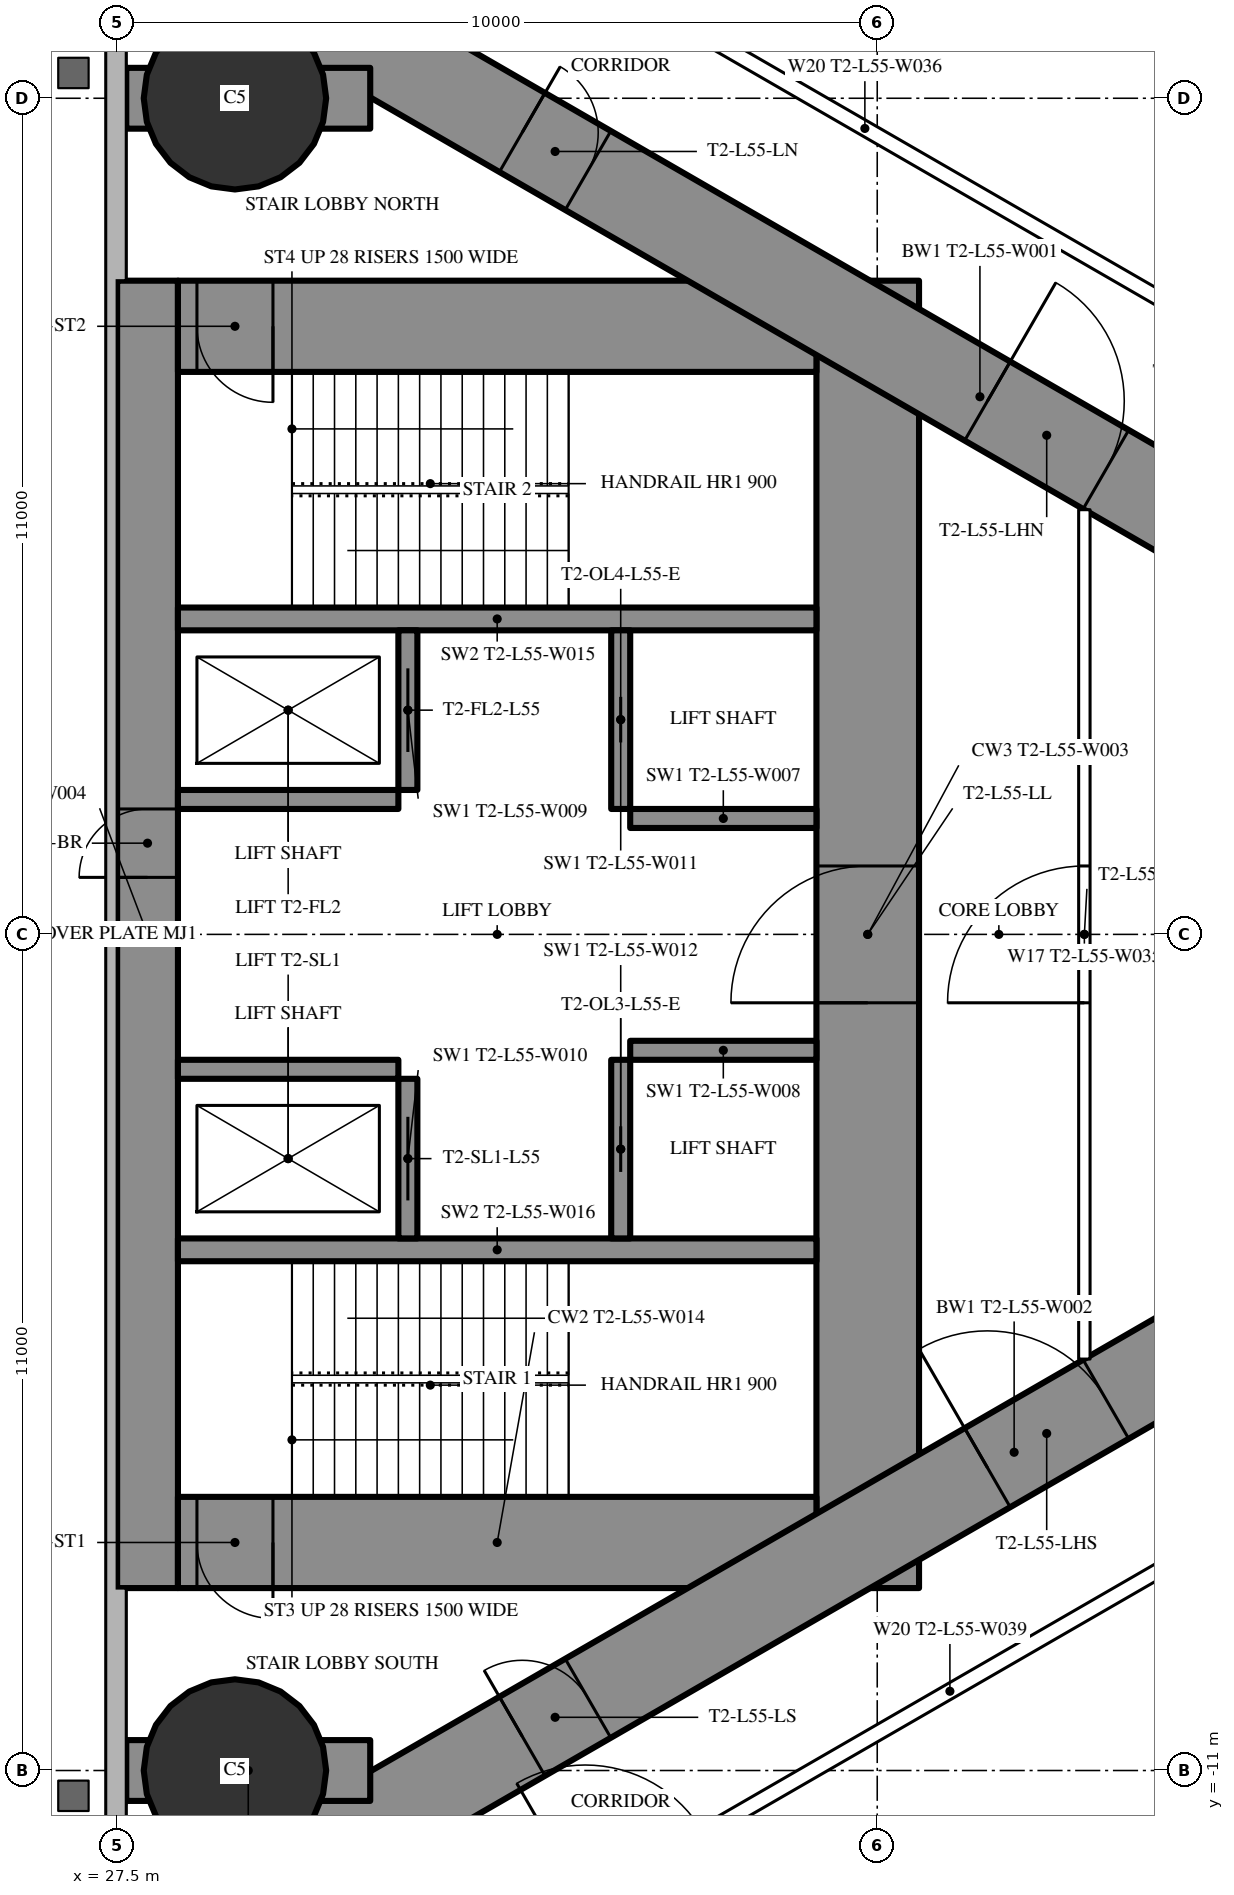
"""IFC4 building model, lengths in metres.
Left out: names, types, materials, properties, quantities, classifications, styles, units other than length and angle.
Written with IfcOpenShell. Run it as: python <this file> out.ifc"""

import sys

from ifc_helpers import new_model, si_unit, direction, frame, frame_2d, origin, origin_2d, place, context, subcontext, project, spatial, rectangle, hollow_circle, extrude, element, fill, save


model = new_model("IFC4")
c1 = context("Model", 3, precision=1e-05, world=origin(), true_north=direction((0.0, 1.0)))
c2 = subcontext(c1, "Body", "Model", "MODEL_VIEW")
j1 = project(units=[si_unit("LENGTHUNIT", "METRE"), si_unit("PLANEANGLEUNIT", "RADIAN")], contexts=[c1])
p1 = place(None, origin())
s1 = spatial("IfcSite", under=j1, at=p1, CompositionType="ELEMENT")
p2 = place(p1, origin())
s2 = spatial("IfcBuilding", under=s1, at=p2, CompositionType="ELEMENT")
p3 = place(p2, frame((0.0, 0.0, 205.3)))
s3 = spatial("IfcBuildingStorey", under=s2, at=p3, CompositionType="ELEMENT", Elevation=205.3)
for number, where, z_axis, x_axis in (
    (1, (29.05, 11.0, 0.0), (0.0, 0.0, 1.0), (1.0, 0.0, 0.0)),
    (2, (29.05, -11.0, 0.0), (0.0, 0.0, 1.0), (1.0, 0.0, 0.0)),
):
    element("IfcColumn", number, at=place(p3, frame(where, z_axis=z_axis, x_axis=x_axis)), inside=s3, PredefinedType="COLUMN", context=c2, shape_type="SweptSolid", body=[
        extrude(hollow_circle(Radius=1.2, WallThickness=0.09, at=origin_2d()), origin(), (0.0, 0.0, 1.0), 5.0),
    ])
p4 = place(p3, frame((27.9, -8.6, 0.0), z_axis=(0.0, 0.0, 1.0), x_axis=(0.0, 1.0, 0.0)))
e3 = element("IfcWall", 3, at=p4, inside=s3, PredefinedType="SHEAR", context=c2, shape_type="SweptSolid", body=[
    extrude(rectangle(XDim=17.2, YDim=0.8, at=frame_2d((8.6, 0.0))), origin(), (0.0, 0.0, 1.0), 5.0),
])
p5 = place(p4, frame((9.35, 0.0, 0.0)))
e4 = element("IfcOpeningElement", 4, at=p5, cuts=e3, PredefinedType="OPENING", context=c2, shape_type="SweptSolid", body=[
    extrude(rectangle(XDim=0.9, YDim=2.2, at=frame_2d((0.45, 1.1))), frame((0.0, 0.41, 0.0), z_axis=(0.0, -1.0, 0.0), x_axis=(1.0, 0.0, 0.0)), (0.0, 0.0, 1.0), 0.82),
])
p6 = place(p3, frame((37.375, -8.6, 0.0), z_axis=(0.0, 0.0, 1.0), x_axis=(0.0, 1.0, 0.0)))
e5 = element("IfcWall", 5, at=p6, inside=s3, PredefinedType="SHEAR", context=c2, shape_type="SweptSolid", body=[
    extrude(rectangle(XDim=17.2, YDim=1.35, at=frame_2d((8.6, 0.0))), origin(), (0.0, 0.0, 1.0), 5.0),
])
p7 = place(p6, frame((7.7, 0.0, 0.0)))
e6 = element("IfcOpeningElement", 6, at=p7, cuts=e5, PredefinedType="OPENING", context=c2, shape_type="SweptSolid", body=[
    extrude(rectangle(XDim=1.8, YDim=2.2, at=frame_2d((0.9, 1.1))), frame((0.0, 0.685, 0.0), z_axis=(0.0, -1.0, 0.0), x_axis=(1.0, 0.0, 0.0)), (0.0, 0.0, 1.0), 1.37),
])
p8 = place(p3, frame((28.3, -8.0, 0.0), z_axis=(0.0, 0.0, 1.0), x_axis=(1.0, 0.0, 0.0)))
e7 = element("IfcWall", 7, at=p8, inside=s3, PredefinedType="SHEAR", context=c2, shape_type="SweptSolid", body=[
    extrude(rectangle(XDim=8.4, YDim=1.2, at=frame_2d((4.2, 0.0))), origin(), (0.0, 0.0, 1.0), 5.0),
])
p9 = place(p8, frame((0.25, 0.0, 0.0)))
e8 = element("IfcOpeningElement", 8, at=p9, cuts=e7, PredefinedType="OPENING", context=c2, shape_type="SweptSolid", body=[
    extrude(rectangle(XDim=1.0, YDim=2.2, at=frame_2d((0.5, 1.1))), frame((0.0, 0.61, 0.0), z_axis=(0.0, -1.0, 0.0), x_axis=(1.0, 0.0, 0.0)), (0.0, 0.0, 1.0), 1.22),
])
p10 = place(p3, frame((28.3, 8.0, 0.0), z_axis=(0.0, 0.0, 1.0), x_axis=(1.0, 0.0, 0.0)))
e9 = element("IfcWall", 9, at=p10, inside=s3, PredefinedType="SHEAR", context=c2, shape_type="SweptSolid", body=[
    extrude(rectangle(XDim=8.4, YDim=1.2, at=frame_2d((4.2, 0.0))), origin(), (0.0, 0.0, 1.0), 5.0),
])
p11 = place(p10, frame((0.25, 0.0, 0.0)))
e10 = element("IfcOpeningElement", 10, at=p11, cuts=e9, PredefinedType="OPENING", context=c2, shape_type="SweptSolid", body=[
    extrude(rectangle(XDim=1.0, YDim=2.2, at=frame_2d((0.5, 1.1))), frame((0.0, 0.61, 0.0), z_axis=(0.0, -1.0, 0.0), x_axis=(1.0, 0.0, 0.0)), (0.0, 0.0, 1.0), 1.22),
])
for number, where, z_axis, x_axis in (
    (11, (28.3, -4.15, 0.0), (0.0, 0.0, 1.0), (1.0, 0.0, 0.0)),
    (12, (28.3, 4.15, 0.0), (0.0, 0.0, 1.0), (1.0, 0.0, 0.0)),
):
    element("IfcWall", number, at=place(p3, frame(where, z_axis=z_axis, x_axis=x_axis)), inside=s3, PredefinedType="SHEAR", context=c2, shape_type="SweptSolid", body=[
        extrude(rectangle(XDim=8.4, YDim=0.3, at=frame_2d((4.2, 0.0))), origin(), (0.0, 0.0, 1.0), 5.0),
    ])
p12 = place(p3, frame((31.325, -4.0, 0.0), z_axis=(0.0, 0.0, 1.0), x_axis=(0.0, 1.0, 0.0)))
e13 = element("IfcWall", 13, at=p12, inside=s3, PredefinedType="SHEAR", context=c2, shape_type="SweptSolid", body=[
    extrude(rectangle(XDim=2.1, YDim=0.25, at=frame_2d((1.05, 0.0))), origin(), (0.0, 0.0, 1.0), 5.0),
])
p13 = place(p12, frame((0.5, 0.0, 0.0)))
e14 = element("IfcOpeningElement", 14, at=p13, cuts=e13, PredefinedType="OPENING", context=c2, shape_type="SweptSolid", body=[
    extrude(rectangle(XDim=1.1, YDim=2.2, at=frame_2d((0.55, 1.1))), frame((0.0, 0.135, 0.0), z_axis=(0.0, -1.0, 0.0), x_axis=(1.0, 0.0, 0.0)), (0.0, 0.0, 1.0), 0.27),
])
p14 = place(p3, frame((34.125, -4.0, 0.0), z_axis=(0.0, 0.0, 1.0), x_axis=(0.0, 1.0, 0.0)))
e15 = element("IfcWall", 15, at=p14, inside=s3, PredefinedType="SHEAR", context=c2, shape_type="SweptSolid", body=[
    extrude(rectangle(XDim=2.35, YDim=0.25, at=frame_2d((1.175, 0.0))), origin(), (0.0, 0.0, 1.0), 5.0),
])
p15 = place(p14, frame((0.875, 0.0, 0.0)))
e16 = element("IfcOpeningElement", 16, at=p15, cuts=e15, PredefinedType="OPENING", context=c2, shape_type="SweptSolid", body=[
    extrude(rectangle(XDim=0.6, YDim=2.0, at=frame_2d((0.3, 1.0))), frame((0.0, 0.135, 0.0), z_axis=(0.0, -1.0, 0.0), x_axis=(1.0, 0.0, 0.0)), (0.0, 0.0, 1.0), 0.27),
])
p16 = place(p3, frame((28.3, -1.775, 0.0), z_axis=(0.0, 0.0, 1.0), x_axis=(1.0, 0.0, 0.0)))
e17 = element("IfcWall", 17, at=p16, inside=s3, PredefinedType="SHEAR", context=c2, shape_type="SweptSolid", body=[
    extrude(rectangle(XDim=2.9, YDim=0.25, at=frame_2d((1.45, 0.0))), origin(), (0.0, 0.0, 1.0), 5.0),
])
p17 = place(p3, frame((34.25, -1.525, 0.0), z_axis=(0.0, 0.0, 1.0), x_axis=(1.0, 0.0, 0.0)))
e18 = element("IfcWall", 18, at=p17, inside=s3, PredefinedType="SHEAR", context=c2, shape_type="SweptSolid", body=[
    extrude(rectangle(XDim=2.45, YDim=0.25, at=frame_2d((1.225, 0.0))), origin(), (0.0, 0.0, 1.0), 5.0),
])
p18 = place(p3, frame((31.325, 1.9, 0.0), z_axis=(0.0, 0.0, 1.0), x_axis=(0.0, 1.0, 0.0)))
e19 = element("IfcWall", 19, at=p18, inside=s3, PredefinedType="SHEAR", context=c2, shape_type="SweptSolid", body=[
    extrude(rectangle(XDim=2.1, YDim=0.25, at=frame_2d((1.05, 0.0))), origin(), (0.0, 0.0, 1.0), 5.0),
])
p19 = place(p18, frame((0.5, 0.0, 0.0)))
e20 = element("IfcOpeningElement", 20, at=p19, cuts=e19, PredefinedType="OPENING", context=c2, shape_type="SweptSolid", body=[
    extrude(rectangle(XDim=1.1, YDim=2.2, at=frame_2d((0.55, 1.1))), frame((0.0, 0.135, 0.0), z_axis=(0.0, -1.0, 0.0), x_axis=(1.0, 0.0, 0.0)), (0.0, 0.0, 1.0), 0.27),
])
p20 = place(p3, frame((34.125, 1.65, 0.0), z_axis=(0.0, 0.0, 1.0), x_axis=(0.0, 1.0, 0.0)))
e21 = element("IfcWall", 21, at=p20, inside=s3, PredefinedType="SHEAR", context=c2, shape_type="SweptSolid", body=[
    extrude(rectangle(XDim=2.35, YDim=0.25, at=frame_2d((1.175, 0.0))), origin(), (0.0, 0.0, 1.0), 5.0),
])
p21 = place(p20, frame((0.875, 0.0, 0.0)))
e22 = element("IfcOpeningElement", 22, at=p21, cuts=e21, PredefinedType="OPENING", context=c2, shape_type="SweptSolid", body=[
    extrude(rectangle(XDim=0.6, YDim=2.0, at=frame_2d((0.3, 1.0))), frame((0.0, 0.135, 0.0), z_axis=(0.0, -1.0, 0.0), x_axis=(1.0, 0.0, 0.0)), (0.0, 0.0, 1.0), 0.27),
])
p22 = place(p3, frame((28.3, 1.775, 0.0), z_axis=(0.0, 0.0, 1.0), x_axis=(1.0, 0.0, 0.0)))
e23 = element("IfcWall", 23, at=p22, inside=s3, PredefinedType="SHEAR", context=c2, shape_type="SweptSolid", body=[
    extrude(rectangle(XDim=2.9, YDim=0.25, at=frame_2d((1.45, 0.0))), origin(), (0.0, 0.0, 1.0), 5.0),
])
p23 = place(p3, frame((34.25, 1.525, 0.0), z_axis=(0.0, 0.0, 1.0), x_axis=(1.0, 0.0, 0.0)))
e24 = element("IfcWall", 24, at=p23, inside=s3, PredefinedType="SHEAR", context=c2, shape_type="SweptSolid", body=[
    extrude(rectangle(XDim=2.45, YDim=0.25, at=frame_2d((1.225, 0.0))), origin(), (0.0, 0.0, 1.0), 5.0),
])
p24 = place(p3, frame((27.2, -13.8, 0.0), z_axis=(0.0, 0.0, 1.0), x_axis=(0.866027159892, 0.499996958321, 0.0)))
e25 = element("IfcWall", 25, at=p24, inside=s3, PredefinedType="SHEAR", context=c2, shape_type="SweptSolid", body=[
    extrude(rectangle(XDim=27.947, YDim=1.2, at=frame_2d((13.973, 0.0))), origin(), (0.0, 0.0, 1.0), 5.0),
])
p25 = place(p24, frame((6.5, 0.0, 0.0)))
e26 = element("IfcOpeningElement", 26, at=p25, cuts=e25, PredefinedType="OPENING", context=c2, shape_type="SweptSolid", body=[
    extrude(rectangle(XDim=1.0, YDim=2.2, at=frame_2d((0.5, 1.1))), frame((0.0, 0.61, 0.0), z_axis=(0.0, -1.0, 0.0), x_axis=(1.0, 0.0, 0.0)), (0.0, 0.0, 1.0), 1.22),
])
p26 = place(p24, frame((13.568, 0.0, 0.0)))
e27 = element("IfcOpeningElement", 27, at=p26, cuts=e25, PredefinedType="OPENING", context=c2, shape_type="SweptSolid", body=[
    extrude(rectangle(XDim=1.8, YDim=2.2, at=frame_2d((0.9, 1.1))), frame((0.0, 0.61, 0.0), z_axis=(0.0, -1.0, 0.0), x_axis=(1.0, 0.0, 0.0)), (0.0, 0.0, 1.0), 1.22),
])
p27 = place(p3, frame((27.2, 13.8, 0.0), z_axis=(0.0, 0.0, 1.0), x_axis=(0.866024515034, -0.500001539357, 0.0)))
e28 = element("IfcWall", 28, at=p27, inside=s3, PredefinedType="SHEAR", context=c2, shape_type="SweptSolid", body=[
    extrude(rectangle(XDim=26.907, YDim=1.2, at=frame_2d((13.454, 0.0))), origin(), (0.0, 0.0, 1.0), 5.0),
])
p28 = place(p27, frame((6.5, 0.0, 0.0)))
e29 = element("IfcOpeningElement", 29, at=p28, cuts=e28, PredefinedType="OPENING", context=c2, shape_type="SweptSolid", body=[
    extrude(rectangle(XDim=1.0, YDim=2.2, at=frame_2d((0.5, 1.1))), frame((0.0, 0.61, 0.0), z_axis=(0.0, -1.0, 0.0), x_axis=(1.0, 0.0, 0.0)), (0.0, 0.0, 1.0), 1.22),
])
p29 = place(p27, frame((13.568, 0.0, 0.0)))
e30 = element("IfcOpeningElement", 30, at=p29, cuts=e28, PredefinedType="OPENING", context=c2, shape_type="SweptSolid", body=[
    extrude(rectangle(XDim=1.8, YDim=2.2, at=frame_2d((0.9, 1.1))), frame((0.0, 0.61, 0.0), z_axis=(0.0, -1.0, 0.0), x_axis=(1.0, 0.0, 0.0)), (0.0, 0.0, 1.0), 1.22),
])
for number, where, z_axis, x_axis in (
    (31, (27.62, -11.0, 0.0), (0.0, 0.0, 1.0), (1.0, 0.0, 0.0)),
    (32, (27.62, 11.0, 0.0), (0.0, 0.0, 1.0), (1.0, 0.0, 0.0)),
):
    element("IfcWall", number, at=place(p3, frame(where, z_axis=z_axis, x_axis=x_axis)), inside=s3, PredefinedType="SHEAR", context=c2, shape_type="SweptSolid", body=[
        extrude(rectangle(XDim=3.209, YDim=0.8, at=frame_2d((1.605, 0.0))), origin(), (0.0, 0.0, 1.0), 5.0),
    ])
p30 = place(p3, frame((27.959, 16.017, 0.0), z_axis=(0.0, 0.0, 1.0), x_axis=(0.866027146794, -0.499996981007, 0.0)))
e33 = element("IfcWall", 33, at=p30, inside=s3, PredefinedType="PARTITIONING", context=c2, shape_type="SweptSolid", body=[
    extrude(rectangle(XDim=21.657, YDim=0.2, at=frame_2d((10.829, 0.0))), origin(), (0.0, 0.0, 1.0), 4.75),
])
p31 = place(p30, frame((15.57, 0.0, 0.0)))
e34 = element("IfcOpeningElement", 34, at=p31, cuts=e33, PredefinedType="OPENING", context=c2, shape_type="SweptSolid", body=[
    extrude(rectangle(XDim=1.8, YDim=2.2, at=frame_2d((0.9, 1.1))), frame((0.0, 0.11, 0.0), z_axis=(0.0, -1.0, 0.0), x_axis=(1.0, 0.0, 0.0)), (0.0, 0.0, 1.0), 0.22),
])
p32 = place(p30, frame((6.579, 0.0, 0.0)))
e35 = element("IfcOpeningElement", 35, at=p32, cuts=e33, PredefinedType="OPENING", context=c2, shape_type="SweptSolid", body=[
    extrude(rectangle(XDim=1.8, YDim=2.2, at=frame_2d((0.9, 1.1))), frame((0.0, 0.11, 0.0), z_axis=(0.0, -1.0, 0.0), x_axis=(1.0, 0.0, 0.0)), (0.0, 0.0, 1.0), 0.22),
])
p33 = place(p3, frame((27.959, -16.017, 0.0), z_axis=(0.0, 0.0, 1.0), x_axis=(0.866026253963, 0.499998527445, 0.0)))
e36 = element("IfcWall", 36, at=p33, inside=s3, PredefinedType="PARTITIONING", context=c2, shape_type="SweptSolid", body=[
    extrude(rectangle(XDim=24.241, YDim=0.2, at=frame_2d((12.12, 0.0))), origin(), (0.0, 0.0, 1.0), 4.75),
])
p34 = place(p33, frame((6.579, 0.0, 0.0)))
e37 = element("IfcOpeningElement", 37, at=p34, cuts=e36, PredefinedType="OPENING", context=c2, shape_type="SweptSolid", body=[
    extrude(rectangle(XDim=1.8, YDim=2.2, at=frame_2d((0.9, 1.1))), frame((0.0, 0.11, 0.0), z_axis=(0.0, -1.0, 0.0), x_axis=(1.0, 0.0, 0.0)), (0.0, 0.0, 1.0), 0.22),
])
p35 = place(p33, frame((17.612, 0.0, 0.0)))
e38 = element("IfcOpeningElement", 38, at=p35, cuts=e36, PredefinedType="OPENING", context=c2, shape_type="SweptSolid", body=[
    extrude(rectangle(XDim=2.0, YDim=2.4, at=frame_2d((1.0, 1.2))), frame((0.0, 0.11, 0.0), z_axis=(0.0, -1.0, 0.0), x_axis=(1.0, 0.0, 0.0)), (0.0, 0.0, 1.0), 0.22),
])
p36 = place(p3, frame((40.225, -5.587, 0.0), z_axis=(0.0, 0.0, 1.0), x_axis=(0.0, 1.0, 0.0)))
e39 = element("IfcWall", 39, at=p36, inside=s3, PredefinedType="PARTITIONING", context=c2, shape_type="SweptSolid", body=[
    extrude(rectangle(XDim=11.174, YDim=0.15, at=frame_2d((5.587, 0.0))), origin(), (0.0, 0.0, 1.0), 4.75),
])
p37 = place(p36, frame((4.687, 0.0, 0.0)))
e40 = element("IfcOpeningElement", 40, at=p37, cuts=e39, PredefinedType="OPENING", context=c2, shape_type="SweptSolid", body=[
    extrude(rectangle(XDim=1.8, YDim=2.2, at=frame_2d((0.9, 1.1))), frame((0.0, 0.085, 0.0), z_axis=(0.0, -1.0, 0.0), x_axis=(1.0, 0.0, 0.0)), (0.0, 0.0, 1.0), 0.17),
])
p38 = place(p37, origin())
e41 = element("IfcDoor", 41, at=p38, inside=s3, OperationType="DOUBLE_DOOR_SINGLE_SWING", PredefinedType="DOOR", context=c2, shape_type="SweptSolid", body=[
    extrude(rectangle(XDim=1.8, YDim=2.2, at=frame_2d((0.9, 1.1))), frame((0.0, 0.025, 0.0), z_axis=(0.0, -1.0, 0.0), x_axis=(1.0, 0.0, 0.0)), (0.0, 0.0, 1.0), 0.05),
])
fill(e40, e41)
p39 = place(p25, origin())
e42 = element("IfcDoor", 42, at=p39, inside=s3, OperationType="SINGLE_SWING_LEFT", PredefinedType="DOOR", context=c2, shape_type="SweptSolid", body=[
    extrude(rectangle(XDim=1.0, YDim=2.2, at=frame_2d((0.5, 1.1))), frame((0.0, 0.025, 0.0), z_axis=(0.0, -1.0, 0.0), x_axis=(1.0, 0.0, 0.0)), (0.0, 0.0, 1.0), 0.05),
])
fill(e26, e42)
p40 = place(p26, origin())
e43 = element("IfcDoor", 43, at=p40, inside=s3, OperationType="DOUBLE_DOOR_SINGLE_SWING", PredefinedType="DOOR", context=c2, shape_type="SweptSolid", body=[
    extrude(rectangle(XDim=1.8, YDim=2.2, at=frame_2d((0.9, 1.1))), frame((0.0, 0.025, 0.0), z_axis=(0.0, -1.0, 0.0), x_axis=(1.0, 0.0, 0.0)), (0.0, 0.0, 1.0), 0.05),
])
fill(e27, e43)
p41 = place(p28, origin())
e44 = element("IfcDoor", 44, at=p41, inside=s3, OperationType="SINGLE_SWING_LEFT", PredefinedType="DOOR", context=c2, shape_type="SweptSolid", body=[
    extrude(rectangle(XDim=1.0, YDim=2.2, at=frame_2d((0.5, 1.1))), frame((0.0, 0.025, 0.0), z_axis=(0.0, -1.0, 0.0), x_axis=(1.0, 0.0, 0.0)), (0.0, 0.0, 1.0), 0.05),
])
fill(e29, e44)
p42 = place(p29, origin())
e45 = element("IfcDoor", 45, at=p42, inside=s3, OperationType="DOUBLE_DOOR_SINGLE_SWING", PredefinedType="DOOR", context=c2, shape_type="SweptSolid", body=[
    extrude(rectangle(XDim=1.8, YDim=2.2, at=frame_2d((0.9, 1.1))), frame((0.0, 0.025, 0.0), z_axis=(0.0, -1.0, 0.0), x_axis=(1.0, 0.0, 0.0)), (0.0, 0.0, 1.0), 0.05),
])
fill(e30, e45)
p43 = place(p7, origin())
e46 = element("IfcDoor", 46, at=p43, inside=s3, OperationType="DOUBLE_DOOR_SINGLE_SWING", PredefinedType="DOOR", context=c2, shape_type="SweptSolid", body=[
    extrude(rectangle(XDim=1.8, YDim=2.2, at=frame_2d((0.9, 1.1))), frame((0.0, 0.025, 0.0), z_axis=(0.0, -1.0, 0.0), x_axis=(1.0, 0.0, 0.0)), (0.0, 0.0, 1.0), 0.05),
])
fill(e6, e46)
p44 = place(p9, origin())
e47 = element("IfcDoor", 47, at=p44, inside=s3, OperationType="SINGLE_SWING_RIGHT", PredefinedType="DOOR", context=c2, shape_type="SweptSolid", body=[
    extrude(rectangle(XDim=1.0, YDim=2.2, at=frame_2d((0.5, 1.1))), frame((0.0, 0.025, 0.0), z_axis=(0.0, -1.0, 0.0), x_axis=(1.0, 0.0, 0.0)), (0.0, 0.0, 1.0), 0.05),
])
fill(e8, e47)
p45 = place(p11, origin())
e48 = element("IfcDoor", 48, at=p45, inside=s3, OperationType="SINGLE_SWING_RIGHT", PredefinedType="DOOR", context=c2, shape_type="SweptSolid", body=[
    extrude(rectangle(XDim=1.0, YDim=2.2, at=frame_2d((0.5, 1.1))), frame((0.0, 0.025, 0.0), z_axis=(0.0, -1.0, 0.0), x_axis=(1.0, 0.0, 0.0)), (0.0, 0.0, 1.0), 0.05),
])
fill(e10, e48)
p46 = place(p5, origin())
e49 = element("IfcDoor", 49, at=p46, inside=s3, OperationType="SINGLE_SWING_LEFT", PredefinedType="DOOR", context=c2, shape_type="SweptSolid", body=[
    extrude(rectangle(XDim=0.9, YDim=2.2, at=frame_2d((0.45, 1.1))), frame((0.0, 0.025, 0.0), z_axis=(0.0, -1.0, 0.0), x_axis=(1.0, 0.0, 0.0)), (0.0, 0.0, 1.0), 0.05),
])
fill(e4, e49)
p47 = place(p13, origin())
e50 = element("IfcDoor", 50, at=p47, inside=s3, OperationType="SLIDING_TO_LEFT", PredefinedType="USERDEFINED", context=c2, shape_type="SweptSolid", body=[
    extrude(rectangle(XDim=1.1, YDim=2.2, at=frame_2d((0.55, 1.1))), frame((0.0, 0.025, 0.0), z_axis=(0.0, -1.0, 0.0), x_axis=(1.0, 0.0, 0.0)), (0.0, 0.0, 1.0), 0.05),
])
fill(e14, e50)
p48 = place(p19, origin())
e51 = element("IfcDoor", 51, at=p48, inside=s3, OperationType="SLIDING_TO_LEFT", PredefinedType="USERDEFINED", context=c2, shape_type="SweptSolid", body=[
    extrude(rectangle(XDim=1.1, YDim=2.2, at=frame_2d((0.55, 1.1))), frame((0.0, 0.025, 0.0), z_axis=(0.0, -1.0, 0.0), x_axis=(1.0, 0.0, 0.0)), (0.0, 0.0, 1.0), 0.05),
])
fill(e20, e51)
p49 = place(p15, origin())
e52 = element("IfcDoor", 52, at=p49, inside=s3, OperationType="SLIDING_TO_LEFT", PredefinedType="DOOR", context=c2, shape_type="SweptSolid", body=[
    extrude(rectangle(XDim=0.6, YDim=2.0, at=frame_2d((0.3, 1.0))), frame((0.0, 0.025, 0.0), z_axis=(0.0, -1.0, 0.0), x_axis=(1.0, 0.0, 0.0)), (0.0, 0.0, 1.0), 0.05),
])
fill(e16, e52)
p50 = place(p21, origin())
e53 = element("IfcDoor", 53, at=p50, inside=s3, OperationType="SLIDING_TO_LEFT", PredefinedType="DOOR", context=c2, shape_type="SweptSolid", body=[
    extrude(rectangle(XDim=0.6, YDim=2.0, at=frame_2d((0.3, 1.0))), frame((0.0, 0.025, 0.0), z_axis=(0.0, -1.0, 0.0), x_axis=(1.0, 0.0, 0.0)), (0.0, 0.0, 1.0), 0.05),
])
fill(e22, e53)
save(model, sys.argv[1])
